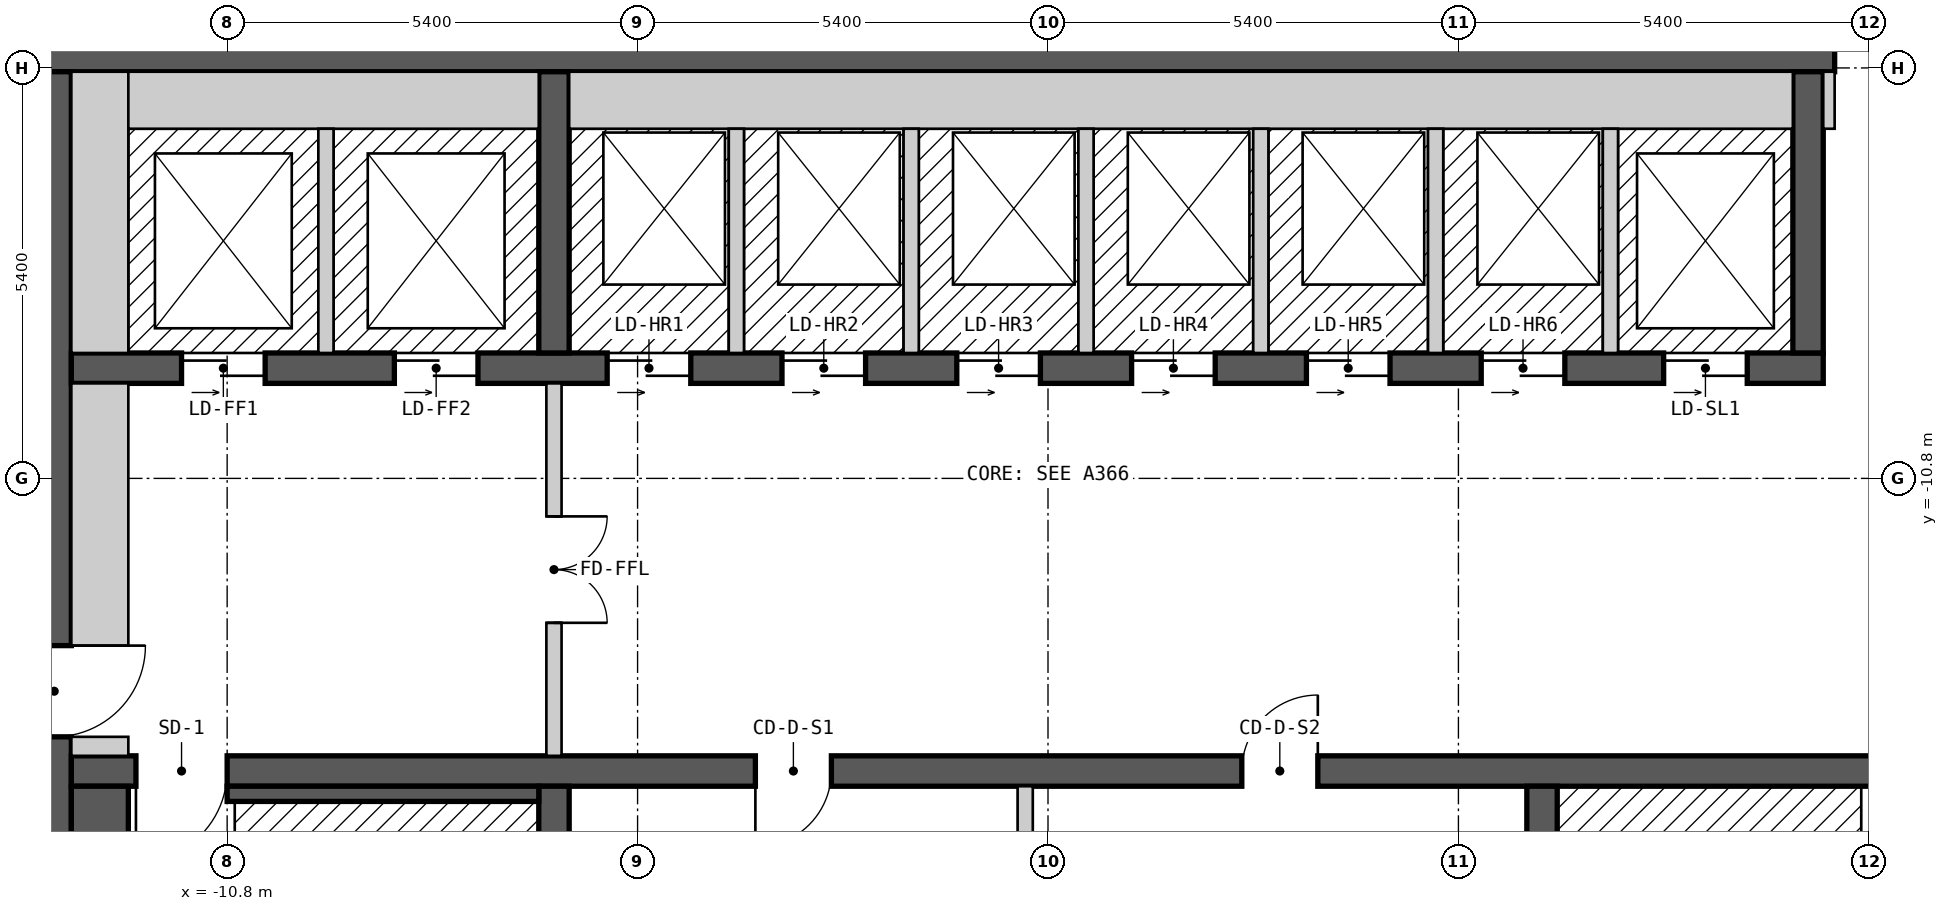
"""IFC4 building model, lengths in metres.
Left out: names, types, materials, properties, quantities, classifications, styles, units other than length and angle.
Written with IfcOpenShell. Run it as: python <this file> out.ifc"""

import sys

from ifc_helpers import new_model, si_unit, direction, frame, frame_2d, origin, place, context, subcontext, project, spatial, rectangle, extrude, element, fill, save


model = new_model("IFC4")
c1 = context("Model", 3, precision=1e-05, world=origin(), true_north=direction((0.0, 1.0)))
c2 = subcontext(c1, "Body", "Model", "MODEL_VIEW")
j1 = project(units=[si_unit("LENGTHUNIT", "METRE"), si_unit("PLANEANGLEUNIT", "RADIAN")], contexts=[c1])
p1 = place(None, origin())
s1 = spatial("IfcSite", under=j1, at=p1, CompositionType="ELEMENT")
p2 = place(p1, origin())
s2 = spatial("IfcBuilding", under=s1, at=p2, CompositionType="ELEMENT")
p3 = place(p2, frame((0.0, 0.0, 241.8)))
s3 = spatial("IfcBuildingStorey", under=s2, at=p3, CompositionType="ELEMENT", Elevation=241.8)
p4 = place(p3, frame((-13.3, -5.225, 0.0), z_axis=(0.0, 0.0, 1.0), x_axis=(1.0, 0.0, 0.0)))
e1 = element("IfcWall", 1, at=p4, inside=s3, PredefinedType="SHEAR", context=c2, shape_type="SweptSolid", body=[
    extrude(rectangle(XDim=26.6, YDim=0.45, at=frame_2d((13.3, 0.0))), origin(), (0.0, 0.0, 1.0), 2.2),
])
p5 = place(p4, frame((23.65, 0.0, 0.0)))
e2 = element("IfcOpeningElement", 2, at=p5, cuts=e1, PredefinedType="OPENING", context=c2, shape_type="SweptSolid", body=[
    extrude(rectangle(XDim=1.2, YDim=2.1, at=frame_2d((0.6, 1.05))), frame((0.0, 0.235, 0.0), z_axis=(0.0, -1.0, 0.0), x_axis=(1.0, 0.0, 0.0)), (0.0, 0.0, 1.0), 0.47),
])
p6 = place(p3, frame((-13.075, -18.55, 0.0), z_axis=(0.0, 0.0, 1.0), x_axis=(0.0, 1.0, 0.0)))
e3 = element("IfcWall", 3, at=p6, inside=s3, PredefinedType="SHEAR", context=c2, shape_type="SweptSolid", body=[
    extrude(rectangle(XDim=13.1, YDim=0.45, at=frame_2d((6.55, 0.0))), origin(), (0.0, 0.0, 1.0), 2.2),
])
p7 = place(p6, frame((4.35, 0.0, 0.0)))
e4 = element("IfcOpeningElement", 4, at=p7, cuts=e3, PredefinedType="OPENING", context=c2, shape_type="SweptSolid", body=[
    extrude(rectangle(XDim=1.2, YDim=2.1, at=frame_2d((0.6, 1.05))), frame((0.0, 0.235, 0.0), z_axis=(0.0, -1.0, 0.0), x_axis=(1.0, 0.0, 0.0)), (0.0, 0.0, 1.0), 0.47),
])
p8 = place(p3, frame((-12.85, -14.65, 0.0), z_axis=(0.0, 0.0, 1.0), x_axis=(1.0, 0.0, 0.0)))
e5 = element("IfcWall", 5, at=p8, inside=s3, PredefinedType="SHEAR", context=c2, shape_type="SweptSolid", body=[
    extrude(rectangle(XDim=25.7, YDim=0.4, at=frame_2d((12.85, 0.0))), origin(), (0.0, 0.0, 1.0), 2.2),
])
p9 = place(p8, frame((2.05, 0.0, 0.0), z_axis=(0.0, 0.0, 1.0), x_axis=(-1.0, 0.0, 0.0)))
e6 = element("IfcOpeningElement", 6, at=p9, cuts=e5, PredefinedType="OPENING", context=c2, shape_type="SweptSolid", body=[
    extrude(rectangle(XDim=1.2, YDim=2.1, at=frame_2d((0.6, 1.05))), frame((0.0, 0.21, 0.0), z_axis=(0.0, -1.0, 0.0), x_axis=(1.0, 0.0, 0.0)), (0.0, 0.0, 1.0), 0.42),
])
p10 = place(p8, frame((24.9, 0.0, 0.0), z_axis=(0.0, 0.0, 1.0), x_axis=(-1.0, 0.0, 0.0)))
e7 = element("IfcOpeningElement", 7, at=p10, cuts=e5, PredefinedType="OPENING", context=c2, shape_type="SweptSolid", body=[
    extrude(rectangle(XDim=1.2, YDim=2.1, at=frame_2d((0.6, 1.05))), frame((0.0, 0.21, 0.0), z_axis=(0.0, -1.0, 0.0), x_axis=(1.0, 0.0, 0.0)), (0.0, 0.0, 1.0), 0.42),
])
p11 = place(p8, frame((10.0, 0.0, 0.0), z_axis=(0.0, 0.0, 1.0), x_axis=(-1.0, 0.0, 0.0)))
e8 = element("IfcOpeningElement", 8, at=p11, cuts=e5, PredefinedType="OPENING", context=c2, shape_type="SweptSolid", body=[
    extrude(rectangle(XDim=1.0, YDim=2.1, at=frame_2d((0.5, 1.05))), frame((0.0, 0.21, 0.0), z_axis=(0.0, -1.0, 0.0), x_axis=(1.0, 0.0, 0.0)), (0.0, 0.0, 1.0), 0.42),
])
p12 = place(p8, frame((16.4, 0.0, 0.0), z_axis=(0.0, 0.0, 1.0), x_axis=(-1.0, 0.0, 0.0)))
e9 = element("IfcOpeningElement", 9, at=p12, cuts=e5, PredefinedType="OPENING", context=c2, shape_type="SweptSolid", body=[
    extrude(rectangle(XDim=1.0, YDim=2.1, at=frame_2d((0.5, 1.05))), frame((0.0, 0.21, 0.0), z_axis=(0.0, -1.0, 0.0), x_axis=(1.0, 0.0, 0.0)), (0.0, 0.0, 1.0), 0.42),
])
p13 = place(p3, frame((-12.85, -9.35, 0.0), z_axis=(0.0, 0.0, 1.0), x_axis=(1.0, 0.0, 0.0)))
e10 = element("IfcWall", 10, at=p13, inside=s3, PredefinedType="SHEAR", context=c2, shape_type="SweptSolid", body=[
    extrude(rectangle(XDim=23.05, YDim=0.4, at=frame_2d((11.525, 0.0))), origin(), (0.0, 0.0, 1.0), 2.2),
])
p14 = place(p13, frame((1.45, 0.0, 0.0)))
e11 = element("IfcOpeningElement", 11, at=p14, cuts=e10, PredefinedType="OPENING", context=c2, shape_type="SweptSolid", body=[
    extrude(rectangle(XDim=1.1, YDim=2.1, at=frame_2d((0.55, 1.05))), frame((0.0, 0.21, 0.0), z_axis=(0.0, -1.0, 0.0), x_axis=(1.0, 0.0, 0.0)), (0.0, 0.0, 1.0), 0.42),
])
p15 = place(p13, frame((4.25, 0.0, 0.0)))
e12 = element("IfcOpeningElement", 12, at=p15, cuts=e10, PredefinedType="OPENING", context=c2, shape_type="SweptSolid", body=[
    extrude(rectangle(XDim=1.1, YDim=2.1, at=frame_2d((0.55, 1.05))), frame((0.0, 0.21, 0.0), z_axis=(0.0, -1.0, 0.0), x_axis=(1.0, 0.0, 0.0)), (0.0, 0.0, 1.0), 0.42),
])
p16 = place(p13, frame((7.05, 0.0, 0.0)))
e13 = element("IfcOpeningElement", 13, at=p16, cuts=e10, PredefinedType="OPENING", context=c2, shape_type="SweptSolid", body=[
    extrude(rectangle(XDim=1.1, YDim=2.1, at=frame_2d((0.55, 1.05))), frame((0.0, 0.21, 0.0), z_axis=(0.0, -1.0, 0.0), x_axis=(1.0, 0.0, 0.0)), (0.0, 0.0, 1.0), 0.42),
])
p17 = place(p13, frame((9.35, 0.0, 0.0)))
e14 = element("IfcOpeningElement", 14, at=p17, cuts=e10, PredefinedType="OPENING", context=c2, shape_type="SweptSolid", body=[
    extrude(rectangle(XDim=1.1, YDim=2.1, at=frame_2d((0.55, 1.05))), frame((0.0, 0.21, 0.0), z_axis=(0.0, -1.0, 0.0), x_axis=(1.0, 0.0, 0.0)), (0.0, 0.0, 1.0), 0.42),
])
p18 = place(p13, frame((11.65, 0.0, 0.0)))
e15 = element("IfcOpeningElement", 15, at=p18, cuts=e10, PredefinedType="OPENING", context=c2, shape_type="SweptSolid", body=[
    extrude(rectangle(XDim=1.1, YDim=2.1, at=frame_2d((0.55, 1.05))), frame((0.0, 0.21, 0.0), z_axis=(0.0, -1.0, 0.0), x_axis=(1.0, 0.0, 0.0)), (0.0, 0.0, 1.0), 0.42),
])
p19 = place(p13, frame((13.95, 0.0, 0.0)))
e16 = element("IfcOpeningElement", 16, at=p19, cuts=e10, PredefinedType="OPENING", context=c2, shape_type="SweptSolid", body=[
    extrude(rectangle(XDim=1.1, YDim=2.1, at=frame_2d((0.55, 1.05))), frame((0.0, 0.21, 0.0), z_axis=(0.0, -1.0, 0.0), x_axis=(1.0, 0.0, 0.0)), (0.0, 0.0, 1.0), 0.42),
])
p20 = place(p13, frame((16.25, 0.0, 0.0)))
e17 = element("IfcOpeningElement", 17, at=p20, cuts=e10, PredefinedType="OPENING", context=c2, shape_type="SweptSolid", body=[
    extrude(rectangle(XDim=1.1, YDim=2.1, at=frame_2d((0.55, 1.05))), frame((0.0, 0.21, 0.0), z_axis=(0.0, -1.0, 0.0), x_axis=(1.0, 0.0, 0.0)), (0.0, 0.0, 1.0), 0.42),
])
p21 = place(p13, frame((18.55, 0.0, 0.0)))
e18 = element("IfcOpeningElement", 18, at=p21, cuts=e10, PredefinedType="OPENING", context=c2, shape_type="SweptSolid", body=[
    extrude(rectangle(XDim=1.1, YDim=2.1, at=frame_2d((0.55, 1.05))), frame((0.0, 0.21, 0.0), z_axis=(0.0, -1.0, 0.0), x_axis=(1.0, 0.0, 0.0)), (0.0, 0.0, 1.0), 0.42),
])
p22 = place(p13, frame((20.95, 0.0, 0.0)))
e19 = element("IfcOpeningElement", 19, at=p22, cuts=e10, PredefinedType="OPENING", context=c2, shape_type="SweptSolid", body=[
    extrude(rectangle(XDim=1.1, YDim=2.1, at=frame_2d((0.55, 1.05))), frame((0.0, 0.21, 0.0), z_axis=(0.0, -1.0, 0.0), x_axis=(1.0, 0.0, 0.0)), (0.0, 0.0, 1.0), 0.42),
])
for number, where, z_axis, x_axis in (
    (20, (-6.5, -18.55, 0.0), (0.0, 0.0, 1.0), (0.0, 1.0, 0.0)),
    (21, (6.5, -18.55, 0.0), (0.0, 0.0, 1.0), (0.0, 1.0, 0.0)),
    (22, (-6.5, -9.15, 0.0), (0.0, 0.0, 1.0), (0.0, 1.0, 0.0)),
    (23, (10.0, -9.15, 0.0), (0.0, 0.0, 1.0), (0.0, 1.0, 0.0)),
):
    element("IfcWall", number, at=place(p3, frame(where, z_axis=z_axis, x_axis=x_axis)), inside=s3, PredefinedType="SHEAR", context=c2, shape_type="SweptSolid", body=[
        extrude(rectangle(XDim=3.7, YDim=0.4, at=frame_2d((1.85, 0.0))), origin(), (0.0, 0.0, 1.0), 2.2),
    ])
p23 = place(p3, frame((-12.475, -18.55, 0.0), z_axis=(0.0, 0.0, 1.0), x_axis=(0.0, 1.0, 0.0)))
e24 = element("IfcWall", 24, at=p23, inside=s3, PredefinedType="SOLIDWALL", context=c2, shape_type="SweptSolid", body=[
    extrude(rectangle(XDim=3.7, YDim=0.75, at=frame_2d((1.85, 0.0))), origin(), (0.0, 0.0, 1.0), 2.2),
])
p24 = place(p3, frame((-12.85, -14.325, 0.0), z_axis=(0.0, 0.0, 1.0), x_axis=(1.0, 0.0, 0.0)))
e25 = element("IfcWall", 25, at=p24, inside=s3, PredefinedType="PARTITIONING", context=c2, shape_type="SweptSolid", body=[
    extrude(rectangle(XDim=0.75, YDim=0.25, at=frame_2d((0.375, 0.0))), origin(), (0.0, 0.0, 1.0), 2.2),
])
p25 = place(p3, frame((-12.475, -13.0, 0.0), z_axis=(0.0, 0.0, 1.0), x_axis=(0.0, 1.0, 0.0)))
e26 = element("IfcWall", 26, at=p25, inside=s3, PredefinedType="PARTITIONING", context=c2, shape_type="SweptSolid", body=[
    extrude(rectangle(XDim=3.45, YDim=0.75, at=frame_2d((1.725, 0.0))), origin(), (0.0, 0.0, 1.0), 2.2),
])
p26 = place(p3, frame((-12.475, -9.15, 0.0), z_axis=(0.0, 0.0, 1.0), x_axis=(0.0, 1.0, 0.0)))
e27 = element("IfcWall", 27, at=p26, inside=s3, PredefinedType="SOLIDWALL", context=c2, shape_type="SweptSolid", body=[
    extrude(rectangle(XDim=3.7, YDim=0.75, at=frame_2d((1.85, 0.0))), origin(), (0.0, 0.0, 1.0), 2.2),
])
p27 = place(p3, frame((-12.1, -5.825, 0.0), z_axis=(0.0, 0.0, 1.0), x_axis=(1.0, 0.0, 0.0)))
e28 = element("IfcWall", 28, at=p27, inside=s3, PredefinedType="SOLIDWALL", context=c2, shape_type="SweptSolid", body=[
    extrude(rectangle(XDim=5.4, YDim=0.75, at=frame_2d((2.7, 0.0))), origin(), (0.0, 0.0, 1.0), 2.2),
])
p28 = place(p3, frame((-10.8, -14.95, 0.0), z_axis=(0.0, 0.0, 1.0), x_axis=(1.0, 0.0, 0.0)))
e29 = element("IfcWall", 29, at=p28, inside=s3, PredefinedType="SOLIDWALL", context=c2, shape_type="SweptSolid", body=[
    extrude(rectangle(XDim=4.1, YDim=0.2, at=frame_2d((2.05, 0.0))), origin(), (0.0, 0.0, 1.0), 2.2),
])
p29 = place(p3, frame((-9.5, -9.15, 0.0), z_axis=(0.0, 0.0, 1.0), x_axis=(0.0, 1.0, 0.0)))
e30 = element("IfcWall", 30, at=p29, inside=s3, PredefinedType="SOLIDWALL", context=c2, shape_type="SweptSolid", body=[
    extrude(rectangle(XDim=2.95, YDim=0.2, at=frame_2d((1.475, 0.0))), origin(), (0.0, 0.0, 1.0), 2.2),
])
p30 = place(p3, frame((-6.5, -14.45, 0.0), z_axis=(0.0, 0.0, 1.0), x_axis=(0.0, 1.0, 0.0)))
e31 = element("IfcWall", 31, at=p30, inside=s3, PredefinedType="PARTITIONING", context=c2, shape_type="SweptSolid", body=[
    extrude(rectangle(XDim=4.9, YDim=0.2, at=frame_2d((2.45, 0.0))), origin(), (0.0, 0.0, 1.0), 2.2),
])
p31 = place(p30, frame((3.15, 0.0, 0.0), z_axis=(0.0, 0.0, 1.0), x_axis=(-1.0, 0.0, 0.0)))
e32 = element("IfcOpeningElement", 32, at=p31, cuts=e31, PredefinedType="OPENING", context=c2, shape_type="SweptSolid", body=[
    extrude(rectangle(XDim=1.4, YDim=2.1, at=frame_2d((0.7, 1.05))), frame((0.0, 0.11, 0.0), z_axis=(0.0, -1.0, 0.0), x_axis=(1.0, 0.0, 0.0)), (0.0, 0.0, 1.0), 0.22),
])
p32 = place(p3, frame((-6.3, -5.825, 0.0), z_axis=(0.0, 0.0, 1.0), x_axis=(1.0, 0.0, 0.0)))
e33 = element("IfcWall", 33, at=p32, inside=s3, PredefinedType="SOLIDWALL", context=c2, shape_type="SweptSolid", body=[
    extrude(rectangle(XDim=16.1, YDim=0.75, at=frame_2d((8.05, 0.0))), origin(), (0.0, 0.0, 1.0), 2.2),
])
for number, where, z_axis, x_axis in (
    (34, (-4.1, -9.15, 0.0), (0.0, 0.0, 1.0), (0.0, 1.0, 0.0)),
    (35, (-1.8, -9.15, 0.0), (0.0, 0.0, 1.0), (0.0, 1.0, 0.0)),
):
    element("IfcWall", number, at=place(p3, frame(where, z_axis=z_axis, x_axis=x_axis)), inside=s3, PredefinedType="SOLIDWALL", context=c2, shape_type="SweptSolid", body=[
        extrude(rectangle(XDim=2.95, YDim=0.2, at=frame_2d((1.475, 0.0))), origin(), (0.0, 0.0, 1.0), 2.2),
    ])
p33 = place(p3, frame((-0.3, -17.8, 0.0), z_axis=(0.0, 0.0, 1.0), x_axis=(0.0, 1.0, 0.0)))
e36 = element("IfcWall", 36, at=p33, inside=s3, PredefinedType="PARTITIONING", context=c2, shape_type="SweptSolid", body=[
    extrude(rectangle(XDim=2.95, YDim=0.2, at=frame_2d((1.475, 0.0))), origin(), (0.0, 0.0, 1.0), 2.2),
])
for number, where, z_axis, x_axis in (
    (37, (0.5, -9.15, 0.0), (0.0, 0.0, 1.0), (0.0, 1.0, 0.0)),
    (38, (2.8, -9.15, 0.0), (0.0, 0.0, 1.0), (0.0, 1.0, 0.0)),
    (39, (5.1, -9.15, 0.0), (0.0, 0.0, 1.0), (0.0, 1.0, 0.0)),
    (40, (7.4, -9.15, 0.0), (0.0, 0.0, 1.0), (0.0, 1.0, 0.0)),
):
    element("IfcWall", number, at=place(p3, frame(where, z_axis=z_axis, x_axis=x_axis)), inside=s3, PredefinedType="SOLIDWALL", context=c2, shape_type="SweptSolid", body=[
        extrude(rectangle(XDim=2.95, YDim=0.2, at=frame_2d((1.475, 0.0))), origin(), (0.0, 0.0, 1.0), 2.2),
    ])
p34 = place(p3, frame((10.275, -6.2, 0.0), z_axis=(0.0, 0.0, 1.0), x_axis=(0.0, 1.0, 0.0)))
e41 = element("IfcWall", 41, at=p34, inside=s3, PredefinedType="PARTITIONING", context=c2, shape_type="SweptSolid", body=[
    extrude(rectangle(XDim=0.75, YDim=0.15, at=frame_2d((0.375, 0.0))), origin(), (0.0, 0.0, 1.0), 2.2),
])
p35 = place(p14, origin())
e42 = element("IfcDoor", 42, at=p35, inside=s3, OperationType="DOUBLE_DOOR_SLIDING", PredefinedType="DOOR", context=c2, shape_type="SweptSolid", body=[
    extrude(rectangle(XDim=1.1, YDim=2.1, at=frame_2d((0.55, 1.05))), frame((0.0, 0.025, 0.0), z_axis=(0.0, -1.0, 0.0), x_axis=(1.0, 0.0, 0.0)), (0.0, 0.0, 1.0), 0.05),
])
fill(e11, e42)
p36 = place(p15, origin())
e43 = element("IfcDoor", 43, at=p36, inside=s3, OperationType="DOUBLE_DOOR_SLIDING", PredefinedType="DOOR", context=c2, shape_type="SweptSolid", body=[
    extrude(rectangle(XDim=1.1, YDim=2.1, at=frame_2d((0.55, 1.05))), frame((0.0, 0.025, 0.0), z_axis=(0.0, -1.0, 0.0), x_axis=(1.0, 0.0, 0.0)), (0.0, 0.0, 1.0), 0.05),
])
fill(e12, e43)
p37 = place(p16, origin())
e44 = element("IfcDoor", 44, at=p37, inside=s3, OperationType="DOUBLE_DOOR_SLIDING", PredefinedType="DOOR", context=c2, shape_type="SweptSolid", body=[
    extrude(rectangle(XDim=1.1, YDim=2.1, at=frame_2d((0.55, 1.05))), frame((0.0, 0.025, 0.0), z_axis=(0.0, -1.0, 0.0), x_axis=(1.0, 0.0, 0.0)), (0.0, 0.0, 1.0), 0.05),
])
fill(e13, e44)
p38 = place(p17, origin())
e45 = element("IfcDoor", 45, at=p38, inside=s3, OperationType="DOUBLE_DOOR_SLIDING", PredefinedType="DOOR", context=c2, shape_type="SweptSolid", body=[
    extrude(rectangle(XDim=1.1, YDim=2.1, at=frame_2d((0.55, 1.05))), frame((0.0, 0.025, 0.0), z_axis=(0.0, -1.0, 0.0), x_axis=(1.0, 0.0, 0.0)), (0.0, 0.0, 1.0), 0.05),
])
fill(e14, e45)
p39 = place(p18, origin())
e46 = element("IfcDoor", 46, at=p39, inside=s3, OperationType="DOUBLE_DOOR_SLIDING", PredefinedType="DOOR", context=c2, shape_type="SweptSolid", body=[
    extrude(rectangle(XDim=1.1, YDim=2.1, at=frame_2d((0.55, 1.05))), frame((0.0, 0.025, 0.0), z_axis=(0.0, -1.0, 0.0), x_axis=(1.0, 0.0, 0.0)), (0.0, 0.0, 1.0), 0.05),
])
fill(e15, e46)
p40 = place(p19, origin())
e47 = element("IfcDoor", 47, at=p40, inside=s3, OperationType="DOUBLE_DOOR_SLIDING", PredefinedType="DOOR", context=c2, shape_type="SweptSolid", body=[
    extrude(rectangle(XDim=1.1, YDim=2.1, at=frame_2d((0.55, 1.05))), frame((0.0, 0.025, 0.0), z_axis=(0.0, -1.0, 0.0), x_axis=(1.0, 0.0, 0.0)), (0.0, 0.0, 1.0), 0.05),
])
fill(e16, e47)
p41 = place(p20, origin())
e48 = element("IfcDoor", 48, at=p41, inside=s3, OperationType="DOUBLE_DOOR_SLIDING", PredefinedType="DOOR", context=c2, shape_type="SweptSolid", body=[
    extrude(rectangle(XDim=1.1, YDim=2.1, at=frame_2d((0.55, 1.05))), frame((0.0, 0.025, 0.0), z_axis=(0.0, -1.0, 0.0), x_axis=(1.0, 0.0, 0.0)), (0.0, 0.0, 1.0), 0.05),
])
fill(e17, e48)
p42 = place(p21, origin())
e49 = element("IfcDoor", 49, at=p42, inside=s3, OperationType="DOUBLE_DOOR_SLIDING", PredefinedType="DOOR", context=c2, shape_type="SweptSolid", body=[
    extrude(rectangle(XDim=1.1, YDim=2.1, at=frame_2d((0.55, 1.05))), frame((0.0, 0.025, 0.0), z_axis=(0.0, -1.0, 0.0), x_axis=(1.0, 0.0, 0.0)), (0.0, 0.0, 1.0), 0.05),
])
fill(e18, e49)
p43 = place(p22, origin())
e50 = element("IfcDoor", 50, at=p43, inside=s3, OperationType="DOUBLE_DOOR_SLIDING", PredefinedType="DOOR", context=c2, shape_type="SweptSolid", body=[
    extrude(rectangle(XDim=1.1, YDim=2.1, at=frame_2d((0.55, 1.05))), frame((0.0, 0.025, 0.0), z_axis=(0.0, -1.0, 0.0), x_axis=(1.0, 0.0, 0.0)), (0.0, 0.0, 1.0), 0.05),
])
fill(e19, e50)
p44 = place(p9, origin())
e51 = element("IfcDoor", 51, at=p44, inside=s3, OperationType="SINGLE_SWING_RIGHT", PredefinedType="DOOR", context=c2, shape_type="SweptSolid", body=[
    extrude(rectangle(XDim=1.2, YDim=2.1, at=frame_2d((0.6, 1.05))), frame((0.0, 0.025, 0.0), z_axis=(0.0, -1.0, 0.0), x_axis=(1.0, 0.0, 0.0)), (0.0, 0.0, 1.0), 0.05),
])
fill(e6, e51)
p45 = place(p7, origin())
e52 = element("IfcDoor", 52, at=p45, inside=s3, OperationType="SINGLE_SWING_RIGHT", PredefinedType="DOOR", context=c2, shape_type="SweptSolid", body=[
    extrude(rectangle(XDim=1.2, YDim=2.1, at=frame_2d((0.6, 1.05))), frame((0.0, 0.025, 0.0), z_axis=(0.0, -1.0, 0.0), x_axis=(1.0, 0.0, 0.0)), (0.0, 0.0, 1.0), 0.05),
])
fill(e4, e52)
p46 = place(p31, origin())
e53 = element("IfcDoor", 53, at=p46, inside=s3, OperationType="DOUBLE_DOOR_SINGLE_SWING", PredefinedType="DOOR", context=c2, shape_type="SweptSolid", body=[
    extrude(rectangle(XDim=1.4, YDim=2.1, at=frame_2d((0.7, 1.05))), frame((0.0, 0.025, 0.0), z_axis=(0.0, -1.0, 0.0), x_axis=(1.0, 0.0, 0.0)), (0.0, 0.0, 1.0), 0.05),
])
fill(e32, e53)
p47 = place(p5, origin())
e54 = element("IfcDoor", 54, at=p47, inside=s3, OperationType="DOUBLE_DOOR_SINGLE_SWING", PredefinedType="DOOR", context=c2, shape_type="SweptSolid", body=[
    extrude(rectangle(XDim=1.2, YDim=2.1, at=frame_2d((0.6, 1.05))), frame((0.0, 0.025, 0.0), z_axis=(0.0, -1.0, 0.0), x_axis=(1.0, 0.0, 0.0)), (0.0, 0.0, 1.0), 0.05),
])
fill(e2, e54)
p48 = place(p11, origin())
e55 = element("IfcDoor", 55, at=p48, inside=s3, OperationType="SINGLE_SWING_RIGHT", PredefinedType="DOOR", context=c2, shape_type="SweptSolid", body=[
    extrude(rectangle(XDim=1.0, YDim=2.1, at=frame_2d((0.5, 1.05))), frame((0.0, 0.025, 0.0), z_axis=(0.0, -1.0, 0.0), x_axis=(1.0, 0.0, 0.0)), (0.0, 0.0, 1.0), 0.05),
])
fill(e8, e55)
p49 = place(p12, origin())
e56 = element("IfcDoor", 56, at=p49, inside=s3, OperationType="SINGLE_SWING_LEFT", PredefinedType="DOOR", context=c2, shape_type="SweptSolid", body=[
    extrude(rectangle(XDim=1.0, YDim=2.1, at=frame_2d((0.5, 1.05))), frame((0.0, 0.025, 0.0), z_axis=(0.0, -1.0, 0.0), x_axis=(1.0, 0.0, 0.0)), (0.0, 0.0, 1.0), 0.05),
])
fill(e9, e56)
save(model, sys.argv[1])
